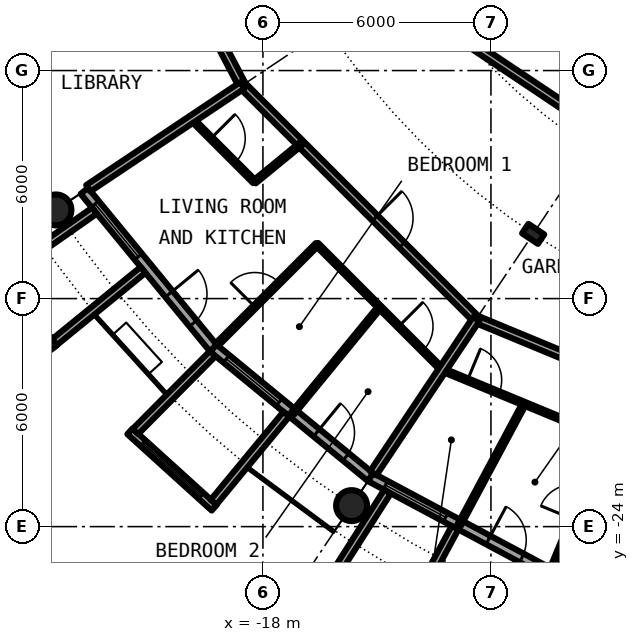
"""IFC4 building model, lengths in metres.
Left out: names, types, materials, properties, quantities, classifications, styles, units other than length and angle.
Written with IfcOpenShell. Run it as: python <this file> out.ifc"""

import sys

from ifc_helpers import new_model, si_unit, direction, frame, frame_2d, origin, origin_2d, place, context, subcontext, project, spatial, rectangle, circle, hollow_circle, i_section, extrude, element, fill, save


model = new_model("IFC4")
c1 = context("Model", 3, precision=1e-05, world=origin(), true_north=direction((0.0, 1.0)))
c2 = subcontext(c1, "Body", "Model", "MODEL_VIEW")
j1 = project(units=[si_unit("LENGTHUNIT", "METRE"), si_unit("PLANEANGLEUNIT", "RADIAN")], contexts=[c1])
p1 = place(None, origin())
s1 = spatial("IfcSite", under=j1, at=p1, CompositionType="ELEMENT")
p2 = place(p1, origin())
s2 = spatial("IfcBuilding", under=s1, at=p2, CompositionType="ELEMENT")
p3 = place(p2, frame((0.0, 0.0, 167.7)))
s3 = spatial("IfcBuildingStorey", under=s2, at=p3, CompositionType="ELEMENT", Elevation=167.7)
for number, where, z_axis, x_axis in (
    (1, (-23.448, -15.667, 0.0), (0.0, 0.0, 1.0), (1.0, 0.0, 0.0)),
    (2, (-15.667, -23.448, 0.0), (0.0, 0.0, 1.0), (1.0, 0.0, 0.0)),
):
    element("IfcColumn", number, at=place(p3, frame(where, z_axis=z_axis, x_axis=x_axis)), inside=s3, PredefinedType="COLUMN", context=c2, shape_type="SweptSolid", body=[
        extrude(hollow_circle(Radius=0.406, WallThickness=0.04, at=origin_2d()), origin(), (0.0, 0.0, 1.0), 3.05),
    ])
p4 = place(p3, frame((-10.889, -16.297, 0.0), z_axis=(0.0, 0.0, 1.0), x_axis=(-0.55557023302, -0.831469612303, 0.0)))
e3 = element("IfcColumn", 3, at=p4, inside=s3, PredefinedType="COLUMN", context=c2, shape_type="SweptSolid", body=[
    extrude(i_section(OverallWidth=0.3, OverallDepth=0.5, WebThickness=0.014, FlangeThickness=0.028, FilletRadius=0.027, at=origin_2d()), origin(), (0.0, 0.0, 1.0), 3.05),
])
p5 = place(p3, frame((-22.699, -15.167, 0.0), z_axis=(0.0, 0.0, 1.0), x_axis=(0.634382322723, -0.773019449054, 0.0)))
e4 = element("IfcWall", 4, at=p5, inside=s3, PredefinedType="SOLIDWALL", context=c2, shape_type="SweptSolid", body=[
    extrude(rectangle(XDim=5.352, YDim=0.25, at=frame_2d((2.676, 0.0))), origin(), (0.0, 0.0, 1.0), 2.7),
])
p6 = place(p5, frame((0.441, 0.0, 0.3)))
e5 = element("IfcOpeningElement", 5, at=p6, cuts=e4, PredefinedType="OPENING", context=c2, shape_type="SweptSolid", body=[
    extrude(rectangle(XDim=1.8, YDim=2.1, at=frame_2d((0.9, 1.05))), frame((0.0, 0.135, 0.0), z_axis=(0.0, -1.0, 0.0), x_axis=(1.0, 0.0, 0.0)), (0.0, 0.0, 1.0), 0.27),
])
p7 = place(p5, frame((3.51, 0.0, 0.0)))
e6 = element("IfcOpeningElement", 6, at=p7, cuts=e4, PredefinedType="OPENING", context=c2, shape_type="SweptSolid", body=[
    extrude(rectangle(XDim=1.0, YDim=2.2, at=frame_2d((0.5, 1.1))), frame((0.0, 0.135, 0.0), z_axis=(0.0, -1.0, 0.0), x_axis=(1.0, 0.0, 0.0)), (0.0, 0.0, 1.0), 0.27),
])
p8 = place(p3, frame((-24.972, -17.337, -0.03), z_axis=(0.0, 0.0, 1.0), x_axis=(0.602806268067, -0.797887588059, 0.0)))
e7 = element("IfcWall", 7, at=p8, inside=s3, PredefinedType="SOLIDWALL", context=c2, shape_type="SweptSolid", body=[
    extrude(rectangle(XDim=2.447, YDim=0.2, at=frame_2d((1.223, 0.0))), origin(), (0.0, 0.0, 1.0), 2.73),
])
p9 = place(p8, frame((0.183, 0.0, 0.33)))
e8 = element("IfcOpeningElement", 8, at=p9, cuts=e7, PredefinedType="OPENING", context=c2, shape_type="SweptSolid", body=[
    extrude(circle(Radius=1.04, at=frame_2d((1.04, 1.04))), frame((0.0, 0.11, 0.0), z_axis=(0.0, -1.0, 0.0), x_axis=(1.0, 0.0, 0.0)), (0.0, 0.0, 1.0), 0.22),
])
p10 = place(p3, frame((-22.433, -15.688, -0.03), z_axis=(0.0, 0.0, 1.0), x_axis=(-0.819373043115, -0.573260687834, 0.0)))
e9 = element("IfcWall", 9, at=p10, inside=s3, PredefinedType="SOLIDWALL", context=c2, shape_type="SweptSolid", body=[
    extrude(rectangle(XDim=2.925, YDim=0.2, at=frame_2d((1.463, 0.0))), origin(), (0.0, 0.0, 1.0), 2.73),
])
p11 = place(p3, frame((-21.155, -17.246, -0.03), z_axis=(0.0, 0.0, 1.0), x_axis=(-0.775179004516, -0.631741648902, 0.0)))
e10 = element("IfcWall", 10, at=p11, inside=s3, PredefinedType="SOLIDWALL", context=c2, shape_type="SweptSolid", body=[
    extrude(rectangle(XDim=3.006, YDim=0.2, at=frame_2d((1.503, 0.0))), origin(), (0.0, 0.0, 1.0), 2.73),
])
p12 = place(p3, frame((-19.304, -19.304, 0.0), z_axis=(0.0, 0.0, 1.0), x_axis=(0.773019449054, -0.634382322723, 0.0)))
e11 = element("IfcWall", 11, at=p12, inside=s3, PredefinedType="SOLIDWALL", context=c2, shape_type="SweptSolid", body=[
    extrude(rectangle(XDim=5.352, YDim=0.25, at=frame_2d((2.676, 0.0))), origin(), (0.0, 0.0, 1.0), 2.7),
])
p13 = place(p12, frame((0.441, 0.0, 0.3)))
e12 = element("IfcOpeningElement", 12, at=p13, cuts=e11, PredefinedType="OPENING", context=c2, shape_type="SweptSolid", body=[
    extrude(rectangle(XDim=1.8, YDim=2.1, at=frame_2d((0.9, 1.05))), frame((0.0, 0.135, 0.0), z_axis=(0.0, -1.0, 0.0), x_axis=(1.0, 0.0, 0.0)), (0.0, 0.0, 1.0), 0.27),
])
p14 = place(p12, frame((3.51, 0.0, 0.0)))
e13 = element("IfcOpeningElement", 13, at=p14, cuts=e11, PredefinedType="OPENING", context=c2, shape_type="SweptSolid", body=[
    extrude(rectangle(XDim=1.0, YDim=2.2, at=frame_2d((0.5, 1.1))), frame((0.0, 0.135, 0.0), z_axis=(0.0, -1.0, 0.0), x_axis=(1.0, 0.0, 0.0)), (0.0, 0.0, 1.0), 0.27),
])
p15 = place(p3, frame((-21.5, -21.493, -0.03), z_axis=(0.0, 0.0, 1.0), x_axis=(0.740998365753, -0.671506829416, 0.0)))
e14 = element("IfcWall", 14, at=p15, inside=s3, PredefinedType="SOLIDWALL", context=c2, shape_type="SweptSolid", body=[
    extrude(rectangle(XDim=2.993, YDim=0.2, at=frame_2d((1.497, 0.0))), origin(), (0.0, 0.0, 1.0), 2.73),
])
p16 = place(p15, frame((0.457, 0.0, 0.33)))
e15 = element("IfcOpeningElement", 15, at=p16, cuts=e14, PredefinedType="OPENING", context=c2, shape_type="SweptSolid", body=[
    extrude(circle(Radius=1.04, at=frame_2d((1.04, 1.04))), frame((0.0, 0.11, 0.0), z_axis=(0.0, -1.0, 0.0), x_axis=(1.0, 0.0, 0.0)), (0.0, 0.0, 1.0), 0.22),
])
p17 = place(p3, frame((-19.323, -19.45, -0.03), z_axis=(0.0, 0.0, 1.0), x_axis=(-0.704476739375, -0.709727076896, 0.0)))
e16 = element("IfcWall", 16, at=p17, inside=s3, PredefinedType="SOLIDWALL", context=c2, shape_type="SweptSolid", body=[
    extrude(rectangle(XDim=2.883, YDim=0.2, at=frame_2d((1.441, 0.0))), origin(), (0.0, 0.0, 1.0), 2.73),
])
p18 = place(p3, frame((-17.384, -21.041, -0.03), z_axis=(0.0, 0.0, 1.0), x_axis=(-0.63709551667, -0.770784861449, 0.0)))
e17 = element("IfcWall", 17, at=p18, inside=s3, PredefinedType="SOLIDWALL", context=c2, shape_type="SweptSolid", body=[
    extrude(rectangle(XDim=3.006, YDim=0.2, at=frame_2d((1.503, 0.0))), origin(), (0.0, 0.0, 1.0), 2.73),
])
p19 = place(p3, frame((-15.167, -22.699, 0.0), z_axis=(0.0, 0.0, 1.0), x_axis=(0.881915646801, -0.471407246368, 0.0)))
e18 = element("IfcWall", 18, at=p19, inside=s3, PredefinedType="SOLIDWALL", context=c2, shape_type="SweptSolid", body=[
    extrude(rectangle(XDim=5.352, YDim=0.25, at=frame_2d((2.676, 0.0))), origin(), (0.0, 0.0, 1.0), 2.7),
])
p20 = place(p19, frame((0.441, 0.0, 0.3)))
e19 = element("IfcOpeningElement", 19, at=p20, cuts=e18, PredefinedType="OPENING", context=c2, shape_type="SweptSolid", body=[
    extrude(rectangle(XDim=1.8, YDim=2.1, at=frame_2d((0.9, 1.05))), frame((0.0, 0.135, 0.0), z_axis=(0.0, -1.0, 0.0), x_axis=(1.0, 0.0, 0.0)), (0.0, 0.0, 1.0), 0.27),
])
p21 = place(p19, frame((3.51, 0.0, 0.0)))
e20 = element("IfcOpeningElement", 20, at=p21, cuts=e18, PredefinedType="OPENING", context=c2, shape_type="SweptSolid", body=[
    extrude(rectangle(XDim=1.0, YDim=2.2, at=frame_2d((0.5, 1.1))), frame((0.0, 0.135, 0.0), z_axis=(0.0, -1.0, 0.0), x_axis=(1.0, 0.0, 0.0)), (0.0, 0.0, 1.0), 0.27),
])
p22 = place(p3, frame((-14.722, -23.079, -0.03), z_axis=(0.0, 0.0, 1.0), x_axis=(-0.537572179146, -0.843217737129, 0.0)))
e21 = element("IfcWall", 21, at=p22, inside=s3, PredefinedType="SOLIDWALL", context=c2, shape_type="SweptSolid", body=[
    extrude(rectangle(XDim=2.924, YDim=0.2, at=frame_2d((1.462, 0.0))), origin(), (0.0, 0.0, 1.0), 2.73),
])
p23 = place(p3, frame((-12.945, -24.029, -0.03), z_axis=(0.0, 0.0, 1.0), x_axis=(-0.474424310775, -0.88029629861, 0.0)))
e22 = element("IfcWall", 22, at=p23, inside=s3, PredefinedType="SOLIDWALL", context=c2, shape_type="SweptSolid", body=[
    extrude(rectangle(XDim=3.006, YDim=0.2, at=frame_2d((1.503, 0.0))), origin(), (0.0, 0.0, 1.0), 2.73),
])
p24 = place(p3, frame((-19.872, -13.278, 0.0), z_axis=(0.0, 0.0, 1.0), x_axis=(0.706897299114, -0.707316201218, 0.0)))
e23 = element("IfcWall", 23, at=p24, inside=s3, PredefinedType="PARTITIONING", context=c2, shape_type="SweptSolid", body=[
    extrude(rectangle(XDim=2.331, YDim=0.1, at=frame_2d((1.166, 0.0))), origin(), (0.0, 0.0, 1.0), 2.7),
])
p25 = place(p24, frame((0.716, 0.0, 0.0)))
e24 = element("IfcOpeningElement", 24, at=p25, cuts=e23, PredefinedType="OPENING", context=c2, shape_type="SweptSolid", body=[
    extrude(rectangle(XDim=0.9, YDim=2.3, at=frame_2d((0.45, 1.15))), frame((0.0, 0.06, 0.0), z_axis=(0.0, -1.0, 0.0), x_axis=(1.0, 0.0, 0.0)), (0.0, 0.0, 1.0), 0.12),
])
p26 = place(p3, frame((-16.581, -16.571, 0.0), z_axis=(0.0, 0.0, 1.0), x_axis=(0.706923494552, -0.707290020325, 0.0)))
e25 = element("IfcWall", 25, at=p26, inside=s3, PredefinedType="PARTITIONING", context=c2, shape_type="SweptSolid", body=[
    extrude(rectangle(XDim=4.663, YDim=0.1, at=frame_2d((2.331, 0.0))), origin(), (0.0, 0.0, 1.0), 2.7),
])
p27 = place(p26, frame((3.051, 0.0, 0.0)))
e26 = element("IfcOpeningElement", 26, at=p27, cuts=e25, PredefinedType="OPENING", context=c2, shape_type="SweptSolid", body=[
    extrude(rectangle(XDim=0.9, YDim=2.3, at=frame_2d((0.45, 1.15))), frame((0.0, 0.06, 0.0), z_axis=(0.0, -1.0, 0.0), x_axis=(1.0, 0.0, 0.0)), (0.0, 0.0, 1.0), 0.12),
])
p28 = place(p3, frame((-13.278, -19.873, 0.0), z_axis=(0.0, 0.0, 1.0), x_axis=(0.923920484476, -0.38258455061, 0.0)))
e27 = element("IfcWall", 27, at=p28, inside=s3, PredefinedType="PARTITIONING", context=c2, shape_type="SweptSolid", body=[
    extrude(rectangle(XDim=4.663, YDim=0.1, at=frame_2d((2.332, 0.0))), origin(), (0.0, 0.0, 1.0), 2.7),
])
p29 = place(p28, frame((0.715, 0.0, 0.0)))
e28 = element("IfcOpeningElement", 28, at=p29, cuts=e27, PredefinedType="OPENING", context=c2, shape_type="SweptSolid", body=[
    extrude(rectangle(XDim=0.9, YDim=2.3, at=frame_2d((0.45, 1.15))), frame((0.0, 0.06, 0.0), z_axis=(0.0, -1.0, 0.0), x_axis=(1.0, 0.0, 0.0)), (0.0, 0.0, 1.0), 0.12),
])
p30 = place(p3, frame((-19.307, -10.935, 0.0), z_axis=(0.0, 0.0, 1.0), x_axis=(0.465605550524, -0.884992356646, 0.0)))
e29 = element("IfcWall", 29, at=p30, inside=s3, PredefinedType="PARTITIONING", context=c2, shape_type="SweptSolid", body=[
    extrude(rectangle(XDim=1.643, YDim=0.2, at=frame_2d((0.821, 0.0))), origin(), (0.0, 0.0, 1.0), 2.7),
])
p31 = place(p3, frame((-18.542, -12.389, 0.0), z_axis=(0.0, 0.0, 1.0), x_axis=(0.707106781187, -0.707106781187, 0.0)))
e30 = element("IfcWall", 30, at=p31, inside=s3, PredefinedType="PARTITIONING", context=c2, shape_type="SweptSolid", body=[
    extrude(rectangle(XDim=8.702, YDim=0.2, at=frame_2d((4.351, 0.0))), origin(), (0.0, 0.0, 1.0), 2.7),
])
p32 = place(p31, frame((4.938, 0.0, 0.0)))
e31 = element("IfcOpeningElement", 31, at=p32, cuts=e30, PredefinedType="OPENING", context=c2, shape_type="SweptSolid", body=[
    extrude(rectangle(XDim=1.0, YDim=2.3, at=frame_2d((0.5, 1.15))), frame((0.0, 0.11, 0.0), z_axis=(0.0, -1.0, 0.0), x_axis=(1.0, 0.0, 0.0)), (0.0, 0.0, 1.0), 0.22),
])
p33 = place(p3, frame((-12.389, -18.542, 0.0), z_axis=(0.0, 0.0, 1.0), x_axis=(0.923867858178, -0.382711615483, 0.0)))
e32 = element("IfcWall", 32, at=p33, inside=s3, PredefinedType="PARTITIONING", context=c2, shape_type="SweptSolid", body=[
    extrude(rectangle(XDim=8.709, YDim=0.2, at=frame_2d((4.354, 0.0))), origin(), (0.0, 0.0, 1.0), 2.7),
])
p34 = place(p33, frame((2.763, 0.0, 0.0)))
e33 = element("IfcOpeningElement", 33, at=p34, cuts=e32, PredefinedType="OPENING", context=c2, shape_type="SweptSolid", body=[
    extrude(rectangle(XDim=1.0, YDim=2.3, at=frame_2d((0.5, 1.15))), frame((0.0, 0.11, 0.0), z_axis=(0.0, -1.0, 0.0), x_axis=(1.0, 0.0, 0.0)), (0.0, 0.0, 1.0), 0.22),
])
p35 = place(p3, frame((-13.309, -10.775, 0.0), z_axis=(0.0, 0.0, 1.0), x_axis=(0.831501812692, -0.555522038708, 0.0)))
e34 = element("IfcWall", 34, at=p35, inside=s3, PredefinedType="PARTITIONING", context=c2, shape_type="SweptSolid", body=[
    extrude(rectangle(XDim=11.856, YDim=0.2, at=frame_2d((5.928, 0.0))), origin(), (0.0, 0.0, 1.0), 2.7),
])
p36 = place(p35, frame((6.272, 0.0, 0.0)))
e35 = element("IfcOpeningElement", 35, at=p36, cuts=e34, PredefinedType="OPENING", context=c2, shape_type="SweptSolid", body=[
    extrude(rectangle(XDim=1.0, YDim=2.3, at=frame_2d((0.5, 1.15))), frame((0.0, 0.11, 0.0), z_axis=(0.0, -1.0, 0.0), x_axis=(1.0, 0.0, 0.0)), (0.0, 0.0, 1.0), 0.22),
])
p37 = place(p3, frame((-22.595, -15.098, 0.0), z_axis=(0.0, 0.0, 1.0), x_axis=(0.831387096605, 0.55569370664, 0.0)))
e36 = element("IfcWall", 36, at=p37, inside=s3, PredefinedType="PARTITIONING", context=c2, shape_type="SweptSolid", body=[
    extrude(rectangle(XDim=4.875, YDim=0.2, at=frame_2d((2.438, 0.0))), origin(), (0.0, 0.0, 1.0), 2.7),
])
p38 = place(p3, frame((-19.216, -19.216, 0.0), z_axis=(0.0, 0.0, 1.0), x_axis=(0.707106781187, 0.707106781187, 0.0)))
e37 = element("IfcWall", 37, at=p38, inside=s3, PredefinedType="PARTITIONING", context=c2, shape_type="SweptSolid", body=[
    extrude(rectangle(XDim=3.735, YDim=0.1, at=frame_2d((1.868, 0.0))), origin(), (0.0, 0.0, 1.0), 2.7),
])
p39 = place(p38, frame((1.417, 0.0, 0.0)))
e38 = element("IfcOpeningElement", 38, at=p39, cuts=e37, PredefinedType="OPENING", context=c2, shape_type="SweptSolid", body=[
    extrude(rectangle(XDim=0.9, YDim=2.3, at=frame_2d((0.45, 1.15))), frame((0.0, 0.06, 0.0), z_axis=(0.0, -1.0, 0.0), x_axis=(1.0, 0.0, 0.0)), (0.0, 0.0, 1.0), 0.12),
])
p40 = place(p3, frame((-18.222, -14.93, 0.0), z_axis=(0.0, 0.0, 1.0), x_axis=(0.773633255921, 0.633633636523, 0.0)))
e39 = element("IfcWall", 39, at=p40, inside=s3, PredefinedType="PARTITIONING", context=c2, shape_type="SweptSolid", body=[
    extrude(rectangle(XDim=1.578, YDim=0.1, at=frame_2d((0.789, 0.0))), origin(), (0.0, 0.0, 1.0), 2.7),
])
p41 = place(p3, frame((-17.22, -21.023, 0.0), z_axis=(0.0, 0.0, 1.0), x_axis=(0.633737383709, 0.773548271597, 0.0)))
e40 = element("IfcWall", 40, at=p41, inside=s3, PredefinedType="PARTITIONING", context=c2, shape_type="SweptSolid", body=[
    extrude(rectangle(XDim=3.618, YDim=0.1, at=frame_2d((1.809, 0.0))), origin(), (0.0, 0.0, 1.0), 2.7),
])
p42 = place(p3, frame((-15.097, -22.596, 0.0), z_axis=(0.0, 0.0, 1.0), x_axis=(0.555462686211, 0.831541462723, 0.0)))
e41 = element("IfcWall", 41, at=p42, inside=s3, PredefinedType="PARTITIONING", context=c2, shape_type="SweptSolid", body=[
    extrude(rectangle(XDim=4.875, YDim=0.2, at=frame_2d((2.438, 0.0))), origin(), (0.0, 0.0, 1.0), 2.7),
])
p43 = place(p3, frame((-12.833, -23.954, 0.0), z_axis=(0.0, 0.0, 1.0), x_axis=(0.472212052488, 0.881484984265, 0.0)))
e42 = element("IfcWall", 42, at=p43, inside=s3, PredefinedType="PARTITIONING", context=c2, shape_type="SweptSolid", body=[
    extrude(rectangle(XDim=3.619, YDim=0.1, at=frame_2d((1.81, 0.0))), origin(), (0.0, 0.0, 1.0), 2.7),
])
p44 = place(p3, frame((-10.399, -25.106, 0.0), z_axis=(0.0, 0.0, 1.0), x_axis=(0.382669377748, 0.923885353999, 0.0)))
e43 = element("IfcWall", 43, at=p44, inside=s3, PredefinedType="PARTITIONING", context=c2, shape_type="SweptSolid", body=[
    extrude(rectangle(XDim=3.734, YDim=0.1, at=frame_2d((1.867, 0.0))), origin(), (0.0, 0.0, 1.0), 2.7),
])
p45 = place(p44, frame((1.417, 0.0, 0.0)))
e44 = element("IfcOpeningElement", 44, at=p45, cuts=e43, PredefinedType="OPENING", context=c2, shape_type="SweptSolid", body=[
    extrude(rectangle(XDim=0.9, YDim=2.3, at=frame_2d((0.45, 1.15))), frame((0.0, 0.06, 0.0), z_axis=(0.0, -1.0, 0.0), x_axis=(1.0, 0.0, 0.0)), (0.0, 0.0, 1.0), 0.12),
])
p46 = place(p6, origin())
e45 = element("IfcWindow", 45, at=p46, inside=s3, PartitioningType="SINGLE_PANEL", PredefinedType="WINDOW", context=c2, shape_type="SweptSolid", body=[
    extrude(rectangle(XDim=1.8, YDim=2.1, at=frame_2d((0.9, 1.05))), frame((0.0, 0.03, 0.0), z_axis=(0.0, -1.0, 0.0), x_axis=(1.0, 0.0, 0.0)), (0.0, 0.0, 1.0), 0.06),
])
fill(e5, e45)
p47 = place(p7, origin())
e46 = element("IfcDoor", 46, at=p47, inside=s3, OperationType="SINGLE_SWING_LEFT", PredefinedType="DOOR", context=c2, shape_type="SweptSolid", body=[
    extrude(rectangle(XDim=1.0, YDim=2.2, at=frame_2d((0.5, 1.1))), frame((0.0, 0.025, 0.0), z_axis=(0.0, -1.0, 0.0), x_axis=(1.0, 0.0, 0.0)), (0.0, 0.0, 1.0), 0.05),
])
fill(e6, e46)
p48 = place(p13, origin())
e47 = element("IfcWindow", 47, at=p48, inside=s3, PartitioningType="SINGLE_PANEL", PredefinedType="WINDOW", context=c2, shape_type="SweptSolid", body=[
    extrude(rectangle(XDim=1.8, YDim=2.1, at=frame_2d((0.9, 1.05))), frame((0.0, 0.03, 0.0), z_axis=(0.0, -1.0, 0.0), x_axis=(1.0, 0.0, 0.0)), (0.0, 0.0, 1.0), 0.06),
])
fill(e12, e47)
p49 = place(p16, origin())
e48 = element("IfcWindow", 48, at=p49, inside=s3, PartitioningType="SINGLE_PANEL", PredefinedType="WINDOW", context=c2, shape_type="SweptSolid", body=[
    extrude(circle(Radius=1.04, at=frame_2d((1.04, 1.04))), frame((0.0, 0.03, 0.0), z_axis=(0.0, -1.0, 0.0), x_axis=(1.0, 0.0, 0.0)), (0.0, 0.0, 1.0), 0.06),
])
fill(e15, e48)
p50 = place(p14, origin())
e49 = element("IfcDoor", 49, at=p50, inside=s3, OperationType="SINGLE_SWING_LEFT", PredefinedType="DOOR", context=c2, shape_type="SweptSolid", body=[
    extrude(rectangle(XDim=1.0, YDim=2.2, at=frame_2d((0.5, 1.1))), frame((0.0, 0.025, 0.0), z_axis=(0.0, -1.0, 0.0), x_axis=(1.0, 0.0, 0.0)), (0.0, 0.0, 1.0), 0.05),
])
fill(e13, e49)
p51 = place(p20, origin())
e50 = element("IfcWindow", 50, at=p51, inside=s3, PartitioningType="SINGLE_PANEL", PredefinedType="WINDOW", context=c2, shape_type="SweptSolid", body=[
    extrude(rectangle(XDim=1.8, YDim=2.1, at=frame_2d((0.9, 1.05))), frame((0.0, 0.03, 0.0), z_axis=(0.0, -1.0, 0.0), x_axis=(1.0, 0.0, 0.0)), (0.0, 0.0, 1.0), 0.06),
])
fill(e19, e50)
p52 = place(p21, origin())
e51 = element("IfcDoor", 51, at=p52, inside=s3, OperationType="SINGLE_SWING_LEFT", PredefinedType="DOOR", context=c2, shape_type="SweptSolid", body=[
    extrude(rectangle(XDim=1.0, YDim=2.2, at=frame_2d((0.5, 1.1))), frame((0.0, 0.025, 0.0), z_axis=(0.0, -1.0, 0.0), x_axis=(1.0, 0.0, 0.0)), (0.0, 0.0, 1.0), 0.05),
])
fill(e20, e51)
p53 = place(p32, origin())
e52 = element("IfcDoor", 52, at=p53, inside=s3, OperationType="SINGLE_SWING_RIGHT", PredefinedType="DOOR", context=c2, shape_type="SweptSolid", body=[
    extrude(rectangle(XDim=1.0, YDim=2.3, at=frame_2d((0.5, 1.15))), frame((0.0, 0.025, 0.0), z_axis=(0.0, -1.0, 0.0), x_axis=(1.0, 0.0, 0.0)), (0.0, 0.0, 1.0), 0.05),
])
fill(e31, e52)
p54 = place(p25, origin())
e53 = element("IfcDoor", 53, at=p54, inside=s3, OperationType="SINGLE_SWING_RIGHT", PredefinedType="DOOR", context=c2, shape_type="SweptSolid", body=[
    extrude(rectangle(XDim=0.9, YDim=2.3, at=frame_2d((0.45, 1.15))), frame((0.0, 0.025, 0.0), z_axis=(0.0, -1.0, 0.0), x_axis=(1.0, 0.0, 0.0)), (0.0, 0.0, 1.0), 0.05),
])
fill(e24, e53)
p55 = place(p39, origin())
e54 = element("IfcDoor", 54, at=p55, inside=s3, OperationType="SINGLE_SWING_LEFT", PredefinedType="DOOR", context=c2, shape_type="SweptSolid", body=[
    extrude(rectangle(XDim=0.9, YDim=2.3, at=frame_2d((0.45, 1.15))), frame((0.0, 0.025, 0.0), z_axis=(0.0, -1.0, 0.0), x_axis=(1.0, 0.0, 0.0)), (0.0, 0.0, 1.0), 0.05),
])
fill(e38, e54)
p56 = place(p27, origin())
e55 = element("IfcDoor", 55, at=p56, inside=s3, OperationType="SINGLE_SWING_RIGHT", PredefinedType="DOOR", context=c2, shape_type="SweptSolid", body=[
    extrude(rectangle(XDim=0.9, YDim=2.3, at=frame_2d((0.45, 1.15))), frame((0.0, 0.025, 0.0), z_axis=(0.0, -1.0, 0.0), x_axis=(1.0, 0.0, 0.0)), (0.0, 0.0, 1.0), 0.05),
])
fill(e26, e55)
p57 = place(p29, origin())
e56 = element("IfcDoor", 56, at=p57, inside=s3, OperationType="SINGLE_SWING_LEFT", PredefinedType="DOOR", context=c2, shape_type="SweptSolid", body=[
    extrude(rectangle(XDim=0.9, YDim=2.3, at=frame_2d((0.45, 1.15))), frame((0.0, 0.025, 0.0), z_axis=(0.0, -1.0, 0.0), x_axis=(1.0, 0.0, 0.0)), (0.0, 0.0, 1.0), 0.05),
])
fill(e28, e56)
save(model, sys.argv[1])
